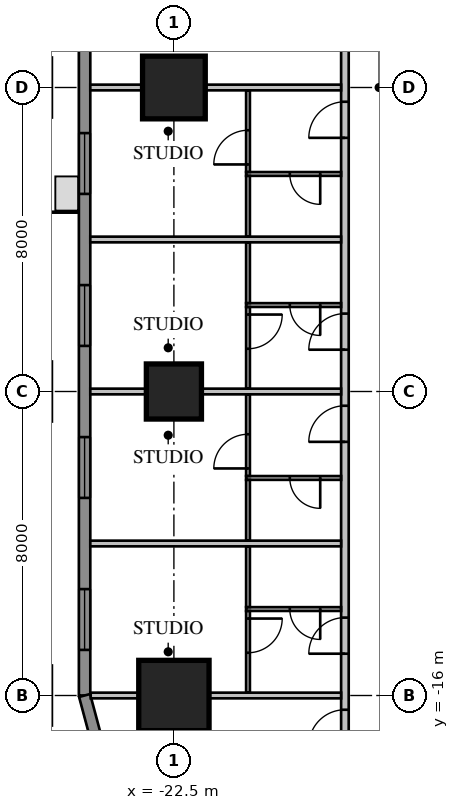
"""IFC4 building model, lengths in metres.
Left out: names, types, materials, properties, quantities, classifications, styles, units other than length and angle.
Written with IfcOpenShell. Run it as: python <this file> out.ifc"""

import sys

from ifc_helpers import new_model, si_unit, direction, frame, frame_2d, origin, origin_2d, place, context, subcontext, project, spatial, rectangle, extrude, element, fill, save


model = new_model("IFC4")
c1 = context("Model", 3, precision=1e-05, world=origin(), true_north=direction((0.0, 1.0)))
c2 = subcontext(c1, "Body", "Model", "MODEL_VIEW")
j1 = project(units=[si_unit("LENGTHUNIT", "METRE"), si_unit("PLANEANGLEUNIT", "RADIAN")], contexts=[c1])
p1 = place(None, origin())
s1 = spatial("IfcSite", under=j1, at=p1, CompositionType="ELEMENT")
p2 = place(p1, origin())
s2 = spatial("IfcBuilding", under=s1, at=p2, CompositionType="ELEMENT")
p3 = place(p2, frame((0.0, 0.0, 50.65)))
s3 = spatial("IfcBuildingStorey", under=s2, at=p3, CompositionType="ELEMENT", Elevation=50.65)
p4 = place(p3, frame((-22.5, 0.0, 0.0), z_axis=(0.0, 0.0, 1.0), x_axis=(1.0, 0.0, 0.0)))
e1 = element("IfcColumn", 1, at=p4, inside=s3, PredefinedType="COLUMN", context=c2, shape_type="SweptSolid", body=[
    extrude(rectangle(XDim=1.65, YDim=1.65, at=origin_2d()), origin(), (0.0, 0.0, 1.0), 3.413),
])
p5 = place(p3, frame((-22.5, -8.0, 0.0), z_axis=(0.0, 0.0, 1.0), x_axis=(1.0, 0.0, 0.0)))
e2 = element("IfcColumn", 2, at=p5, inside=s3, PredefinedType="COLUMN", context=c2, shape_type="SweptSolid", body=[
    extrude(rectangle(XDim=1.45, YDim=1.45, at=origin_2d()), origin(), (0.0, 0.0, 1.0), 3.413),
])
p6 = place(p3, frame((-22.5, -16.0, 0.0), z_axis=(0.0, 0.0, 1.0), x_axis=(1.0, 0.0, 0.0)))
e3 = element("IfcColumn", 3, at=p6, inside=s3, PredefinedType="COLUMN", context=c2, shape_type="SweptSolid", body=[
    extrude(rectangle(XDim=1.85, YDim=1.85, at=origin_2d()), origin(), (0.0, 0.0, 1.0), 3.413),
])
p7 = place(p3, frame((-24.85, 16.0, 0.0), z_axis=(0.0, 0.0, 1.0), x_axis=(0.0, -1.0, 0.0)))
e4 = element("IfcWall", 4, at=p7, inside=s3, PredefinedType="SOLIDWALL", context=c2, shape_type="SweptSolid", body=[
    extrude(rectangle(XDim=32.0, YDim=0.3, at=frame_2d((16.0, 0.0))), origin(), (0.0, 0.0, 1.0), 3.65),
])
p8 = place(p7, frame((1.2, 0.0, 0.75)))
e5 = element("IfcOpeningElement", 5, at=p8, cuts=e4, PredefinedType="OPENING", context=c2, shape_type="SweptSolid", body=[
    extrude(rectangle(XDim=1.6, YDim=1.8, at=frame_2d((0.8, 0.9))), frame((0.0, 0.17, 0.0), z_axis=(0.0, -1.0, 0.0), x_axis=(1.0, 0.0, 0.0)), (0.0, 0.0, 1.0), 0.34),
])
p9 = place(p7, frame((5.2, 0.0, 0.75)))
e6 = element("IfcOpeningElement", 6, at=p9, cuts=e4, PredefinedType="OPENING", context=c2, shape_type="SweptSolid", body=[
    extrude(rectangle(XDim=1.6, YDim=1.8, at=frame_2d((0.8, 0.9))), frame((0.0, 0.17, 0.0), z_axis=(0.0, -1.0, 0.0), x_axis=(1.0, 0.0, 0.0)), (0.0, 0.0, 1.0), 0.34),
])
p10 = place(p7, frame((17.2, 0.0, 0.75)))
e7 = element("IfcOpeningElement", 7, at=p10, cuts=e4, PredefinedType="OPENING", context=c2, shape_type="SweptSolid", body=[
    extrude(rectangle(XDim=1.6, YDim=1.8, at=frame_2d((0.8, 0.9))), frame((0.0, 0.17, 0.0), z_axis=(0.0, -1.0, 0.0), x_axis=(1.0, 0.0, 0.0)), (0.0, 0.0, 1.0), 0.34),
])
p11 = place(p7, frame((21.2, 0.0, 0.75)))
e8 = element("IfcOpeningElement", 8, at=p11, cuts=e4, PredefinedType="OPENING", context=c2, shape_type="SweptSolid", body=[
    extrude(rectangle(XDim=1.6, YDim=1.8, at=frame_2d((0.8, 0.9))), frame((0.0, 0.17, 0.0), z_axis=(0.0, -1.0, 0.0), x_axis=(1.0, 0.0, 0.0)), (0.0, 0.0, 1.0), 0.34),
])
p12 = place(p7, frame((25.2, 0.0, 0.75)))
e9 = element("IfcOpeningElement", 9, at=p12, cuts=e4, PredefinedType="OPENING", context=c2, shape_type="SweptSolid", body=[
    extrude(rectangle(XDim=1.6, YDim=1.8, at=frame_2d((0.8, 0.9))), frame((0.0, 0.17, 0.0), z_axis=(0.0, -1.0, 0.0), x_axis=(1.0, 0.0, 0.0)), (0.0, 0.0, 1.0), 0.34),
])
p13 = place(p7, frame((29.2, 0.0, 0.75)))
e10 = element("IfcOpeningElement", 10, at=p13, cuts=e4, PredefinedType="OPENING", context=c2, shape_type="SweptSolid", body=[
    extrude(rectangle(XDim=1.6, YDim=1.8, at=frame_2d((0.8, 0.9))), frame((0.0, 0.17, 0.0), z_axis=(0.0, -1.0, 0.0), x_axis=(1.0, 0.0, 0.0)), (0.0, 0.0, 1.0), 0.34),
])
p14 = place(p7, frame((8.8, 0.0, 0.75)))
e11 = element("IfcOpeningElement", 11, at=p14, cuts=e4, PredefinedType="OPENING", context=c2, shape_type="SweptSolid", body=[
    extrude(rectangle(XDim=2.4, YDim=1.8, at=frame_2d((1.2, 0.9))), frame((0.0, 0.17, 0.0), z_axis=(0.0, -1.0, 0.0), x_axis=(1.0, 0.0, 0.0)), (0.0, 0.0, 1.0), 0.34),
])
p15 = place(p7, frame((13.812, 0.0, 0.0)))
e12 = element("IfcOpeningElement", 12, at=p15, cuts=e4, PredefinedType="OPENING", context=c2, shape_type="SweptSolid", body=[
    extrude(rectangle(XDim=1.0, YDim=2.4, at=frame_2d((0.5, 1.2))), frame((0.0, 0.17, 0.0), z_axis=(0.0, -1.0, 0.0), x_axis=(1.0, 0.0, 0.0)), (0.0, 0.0, 1.0), 0.34),
])
p16 = place(p3, frame((-24.85, -16.0, 0.0), z_axis=(0.0, 0.0, 1.0), x_axis=(0.258839972501, -0.965920218567, 0.0)))
e13 = element("IfcWall", 13, at=p16, inside=s3, PredefinedType="SOLIDWALL", context=c2, shape_type="SweptSolid", body=[
    extrude(rectangle(XDim=4.581, YDim=0.3, at=frame_2d((2.291, 0.0))), origin(), (0.0, 0.0, 1.0), 3.65),
])
p17 = place(p3, frame((-18.0, 18.0, 0.0), z_axis=(0.0, 0.0, 1.0), x_axis=(0.0, -1.0, 0.0)))
e14 = element("IfcWall", 14, at=p17, inside=s3, PredefinedType="PARTITIONING", context=c2, shape_type="SweptSolid", body=[
    extrude(rectangle(XDim=36.0, YDim=0.2, at=frame_2d((18.0, 0.0))), origin(), (0.0, 0.0, 1.0), 3.65),
])
p18 = place(p17, frame((0.375, 0.0, 0.0)))
e15 = element("IfcOpeningElement", 15, at=p18, cuts=e14, PredefinedType="OPENING", context=c2, shape_type="SweptSolid", body=[
    extrude(rectangle(XDim=1.0, YDim=2.1, at=frame_2d((0.5, 1.05))), frame((0.0, 0.12, 0.0), z_axis=(0.0, -1.0, 0.0), x_axis=(1.0, 0.0, 0.0)), (0.0, 0.0, 1.0), 0.24),
])
p19 = place(p17, frame((2.375, 0.0, 0.0)))
e16 = element("IfcOpeningElement", 16, at=p19, cuts=e14, PredefinedType="OPENING", context=c2, shape_type="SweptSolid", body=[
    extrude(rectangle(XDim=0.95, YDim=2.1, at=frame_2d((0.475, 1.05))), frame((0.0, 0.12, 0.0), z_axis=(0.0, -1.0, 0.0), x_axis=(1.0, 0.0, 0.0)), (0.0, 0.0, 1.0), 0.24),
])
p20 = place(p17, frame((7.95, 0.0, 0.0)))
e17 = element("IfcOpeningElement", 17, at=p20, cuts=e14, PredefinedType="OPENING", context=c2, shape_type="SweptSolid", body=[
    extrude(rectangle(XDim=0.95, YDim=2.1, at=frame_2d((0.475, 1.05))), frame((0.0, 0.12, 0.0), z_axis=(0.0, -1.0, 0.0), x_axis=(1.0, 0.0, 0.0)), (0.0, 0.0, 1.0), 0.24),
])
p21 = place(p17, frame((18.375, 0.0, 0.0)))
e18 = element("IfcOpeningElement", 18, at=p21, cuts=e14, PredefinedType="OPENING", context=c2, shape_type="SweptSolid", body=[
    extrude(rectangle(XDim=0.95, YDim=2.1, at=frame_2d((0.475, 1.05))), frame((0.0, 0.12, 0.0), z_axis=(0.0, -1.0, 0.0), x_axis=(1.0, 0.0, 0.0)), (0.0, 0.0, 1.0), 0.24),
])
p22 = place(p17, frame((23.95, 0.0, 0.0)))
e19 = element("IfcOpeningElement", 19, at=p22, cuts=e14, PredefinedType="OPENING", context=c2, shape_type="SweptSolid", body=[
    extrude(rectangle(XDim=0.95, YDim=2.1, at=frame_2d((0.475, 1.05))), frame((0.0, 0.12, 0.0), z_axis=(0.0, -1.0, 0.0), x_axis=(1.0, 0.0, 0.0)), (0.0, 0.0, 1.0), 0.24),
])
p23 = place(p17, frame((26.375, 0.0, 0.0)))
e20 = element("IfcOpeningElement", 20, at=p23, cuts=e14, PredefinedType="OPENING", context=c2, shape_type="SweptSolid", body=[
    extrude(rectangle(XDim=0.95, YDim=2.1, at=frame_2d((0.475, 1.05))), frame((0.0, 0.12, 0.0), z_axis=(0.0, -1.0, 0.0), x_axis=(1.0, 0.0, 0.0)), (0.0, 0.0, 1.0), 0.24),
])
p24 = place(p17, frame((31.95, 0.0, 0.0)))
e21 = element("IfcOpeningElement", 21, at=p24, cuts=e14, PredefinedType="OPENING", context=c2, shape_type="SweptSolid", body=[
    extrude(rectangle(XDim=0.95, YDim=2.1, at=frame_2d((0.475, 1.05))), frame((0.0, 0.12, 0.0), z_axis=(0.0, -1.0, 0.0), x_axis=(1.0, 0.0, 0.0)), (0.0, 0.0, 1.0), 0.24),
])
p25 = place(p17, frame((34.375, 0.0, 0.0)))
e22 = element("IfcOpeningElement", 22, at=p25, cuts=e14, PredefinedType="OPENING", context=c2, shape_type="SweptSolid", body=[
    extrude(rectangle(XDim=0.95, YDim=2.1, at=frame_2d((0.475, 1.05))), frame((0.0, 0.12, 0.0), z_axis=(0.0, -1.0, 0.0), x_axis=(1.0, 0.0, 0.0)), (0.0, 0.0, 1.0), 0.24),
])
p26 = place(p17, frame((11.2, 0.0, 0.0)))
e23 = element("IfcOpeningElement", 23, at=p26, cuts=e14, PredefinedType="OPENING", context=c2, shape_type="SweptSolid", body=[
    extrude(rectangle(XDim=1.0, YDim=2.1, at=frame_2d((0.5, 1.05))), frame((0.0, 0.12, 0.0), z_axis=(0.0, -1.0, 0.0), x_axis=(1.0, 0.0, 0.0)), (0.0, 0.0, 1.0), 0.24),
])
p27 = place(p3, frame((-18.1, 0.0, 0.0), z_axis=(0.0, 0.0, 1.0), x_axis=(-1.0, 0.0, 0.0)))
e24 = element("IfcWall", 24, at=p27, inside=s3, PredefinedType="PARTITIONING", context=c2, shape_type="SweptSolid", body=[
    extrude(rectangle(XDim=6.6, YDim=0.15, at=frame_2d((3.3, 0.0))), origin(), (0.0, 0.0, 1.0), 2.888),
])
for number, where, z_axis, x_axis in (
    (25, (-18.1, -4.0, 0.0), (0.0, 0.0, 1.0), (-1.0, 0.0, 0.0)),
    (26, (-18.1, -8.0, 0.0), (0.0, 0.0, 1.0), (-1.0, 0.0, 0.0)),
    (27, (-18.1, -12.0, 0.0), (0.0, 0.0, 1.0), (-1.0, 0.0, 0.0)),
):
    element("IfcWall", number, at=place(p3, frame(where, z_axis=z_axis, x_axis=x_axis)), inside=s3, PredefinedType="PARTITIONING", context=c2, shape_type="SweptSolid", body=[
        extrude(rectangle(XDim=6.6, YDim=0.15, at=frame_2d((3.3, 0.0))), origin(), (0.0, 0.0, 1.0), 3.65),
    ])
p28 = place(p3, frame((-18.1, -16.0, 0.0), z_axis=(0.0, 0.0, 1.0), x_axis=(-1.0, 0.0, 0.0)))
e28 = element("IfcWall", 28, at=p28, inside=s3, PredefinedType="PARTITIONING", context=c2, shape_type="SweptSolid", body=[
    extrude(rectangle(XDim=6.589, YDim=0.15, at=frame_2d((3.295, 0.0))), origin(), (0.0, 0.0, 1.0), 3.65),
])
p29 = place(p3, frame((-18.1, -2.275, 0.0), z_axis=(0.0, 0.0, 1.0), x_axis=(-1.0, 0.0, 0.0)))
e29 = element("IfcWall", 29, at=p29, inside=s3, PredefinedType="PARTITIONING", context=c2, shape_type="SweptSolid", body=[
    extrude(rectangle(XDim=2.5, YDim=0.1, at=frame_2d((1.25, 0.0))), origin(), (0.0, 0.0, 1.0), 3.65),
])
p30 = place(p29, frame((0.55, 0.0, 0.0)))
e30 = element("IfcOpeningElement", 30, at=p30, cuts=e29, PredefinedType="OPENING", context=c2, shape_type="SweptSolid", body=[
    extrude(rectangle(XDim=0.8, YDim=2.1, at=frame_2d((0.4, 1.05))), frame((0.0, 0.07, 0.0), z_axis=(0.0, -1.0, 0.0), x_axis=(1.0, 0.0, 0.0)), (0.0, 0.0, 1.0), 0.14),
])
p31 = place(p3, frame((-20.55, -2.325, 0.0), z_axis=(0.0, 0.0, 1.0), x_axis=(0.0, -1.0, 0.0)))
e31 = element("IfcWall", 31, at=p31, inside=s3, PredefinedType="PARTITIONING", context=c2, shape_type="SweptSolid", body=[
    extrude(rectangle(XDim=1.6, YDim=0.1, at=frame_2d((0.8, 0.0))), origin(), (0.0, 0.0, 1.0), 3.65),
])
p32 = place(p3, frame((-18.1, -5.725, 0.0), z_axis=(0.0, 0.0, 1.0), x_axis=(-1.0, 0.0, 0.0)))
e32 = element("IfcWall", 32, at=p32, inside=s3, PredefinedType="PARTITIONING", context=c2, shape_type="SweptSolid", body=[
    extrude(rectangle(XDim=2.5, YDim=0.1, at=frame_2d((1.25, 0.0))), origin(), (0.0, 0.0, 1.0), 3.65),
])
p33 = place(p32, frame((0.55, 0.0, 0.0)))
e33 = element("IfcOpeningElement", 33, at=p33, cuts=e32, PredefinedType="OPENING", context=c2, shape_type="SweptSolid", body=[
    extrude(rectangle(XDim=0.8, YDim=2.1, at=frame_2d((0.4, 1.05))), frame((0.0, 0.07, 0.0), z_axis=(0.0, -1.0, 0.0), x_axis=(1.0, 0.0, 0.0)), (0.0, 0.0, 1.0), 0.14),
])
p34 = place(p3, frame((-20.55, -4.075, 0.0), z_axis=(0.0, 0.0, 1.0), x_axis=(0.0, -1.0, 0.0)))
e34 = element("IfcWall", 34, at=p34, inside=s3, PredefinedType="PARTITIONING", context=c2, shape_type="SweptSolid", body=[
    extrude(rectangle(XDim=1.6, YDim=0.1, at=frame_2d((0.8, 0.0))), origin(), (0.0, 0.0, 1.0), 3.65),
])
p35 = place(p3, frame((-18.1, -10.275, 0.0), z_axis=(0.0, 0.0, 1.0), x_axis=(-1.0, 0.0, 0.0)))
e35 = element("IfcWall", 35, at=p35, inside=s3, PredefinedType="PARTITIONING", context=c2, shape_type="SweptSolid", body=[
    extrude(rectangle(XDim=2.5, YDim=0.1, at=frame_2d((1.25, 0.0))), origin(), (0.0, 0.0, 1.0), 3.65),
])
p36 = place(p35, frame((0.55, 0.0, 0.0)))
e36 = element("IfcOpeningElement", 36, at=p36, cuts=e35, PredefinedType="OPENING", context=c2, shape_type="SweptSolid", body=[
    extrude(rectangle(XDim=0.8, YDim=2.1, at=frame_2d((0.4, 1.05))), frame((0.0, 0.07, 0.0), z_axis=(0.0, -1.0, 0.0), x_axis=(1.0, 0.0, 0.0)), (0.0, 0.0, 1.0), 0.14),
])
p37 = place(p3, frame((-20.55, -10.325, 0.0), z_axis=(0.0, 0.0, 1.0), x_axis=(0.0, -1.0, 0.0)))
e37 = element("IfcWall", 37, at=p37, inside=s3, PredefinedType="PARTITIONING", context=c2, shape_type="SweptSolid", body=[
    extrude(rectangle(XDim=1.6, YDim=0.1, at=frame_2d((0.8, 0.0))), origin(), (0.0, 0.0, 1.0), 3.65),
])
p38 = place(p3, frame((-18.1, -13.725, 0.0), z_axis=(0.0, 0.0, 1.0), x_axis=(-1.0, 0.0, 0.0)))
e38 = element("IfcWall", 38, at=p38, inside=s3, PredefinedType="PARTITIONING", context=c2, shape_type="SweptSolid", body=[
    extrude(rectangle(XDim=2.5, YDim=0.1, at=frame_2d((1.25, 0.0))), origin(), (0.0, 0.0, 1.0), 3.65),
])
p39 = place(p38, frame((0.55, 0.0, 0.0)))
e39 = element("IfcOpeningElement", 39, at=p39, cuts=e38, PredefinedType="OPENING", context=c2, shape_type="SweptSolid", body=[
    extrude(rectangle(XDim=0.8, YDim=2.1, at=frame_2d((0.4, 1.05))), frame((0.0, 0.07, 0.0), z_axis=(0.0, -1.0, 0.0), x_axis=(1.0, 0.0, 0.0)), (0.0, 0.0, 1.0), 0.14),
])
p40 = place(p3, frame((-20.55, -12.075, 0.0), z_axis=(0.0, 0.0, 1.0), x_axis=(0.0, -1.0, 0.0)))
e40 = element("IfcWall", 40, at=p40, inside=s3, PredefinedType="PARTITIONING", context=c2, shape_type="SweptSolid", body=[
    extrude(rectangle(XDim=1.6, YDim=0.1, at=frame_2d((0.8, 0.0))), origin(), (0.0, 0.0, 1.0), 3.65),
])
p41 = place(p3, frame((-20.55, -0.075, 0.0), z_axis=(0.0, 0.0, 1.0), x_axis=(0.0, -1.0, 0.0)))
e41 = element("IfcWall", 41, at=p41, inside=s3, PredefinedType="PARTITIONING", context=c2, shape_type="SweptSolid", body=[
    extrude(rectangle(XDim=2.15, YDim=0.1, at=frame_2d((1.075, 0.0))), origin(), (0.0, 0.0, 1.0), 3.65),
])
p42 = place(p41, frame((1.05, 0.0, 0.0)))
e42 = element("IfcOpeningElement", 42, at=p42, cuts=e41, PredefinedType="OPENING", context=c2, shape_type="SweptSolid", body=[
    extrude(rectangle(XDim=0.9, YDim=2.1, at=frame_2d((0.45, 1.05))), frame((0.0, 0.07, 0.0), z_axis=(0.0, -1.0, 0.0), x_axis=(1.0, 0.0, 0.0)), (0.0, 0.0, 1.0), 0.14),
])
p43 = place(p3, frame((-20.55, -5.775, 0.0), z_axis=(0.0, 0.0, 1.0), x_axis=(0.0, -1.0, 0.0)))
e43 = element("IfcWall", 43, at=p43, inside=s3, PredefinedType="PARTITIONING", context=c2, shape_type="SweptSolid", body=[
    extrude(rectangle(XDim=2.15, YDim=0.1, at=frame_2d((1.075, 0.0))), origin(), (0.0, 0.0, 1.0), 3.65),
])
p44 = place(p43, frame((0.2, 0.0, 0.0)))
e44 = element("IfcOpeningElement", 44, at=p44, cuts=e43, PredefinedType="OPENING", context=c2, shape_type="SweptSolid", body=[
    extrude(rectangle(XDim=0.9, YDim=2.1, at=frame_2d((0.45, 1.05))), frame((0.0, 0.07, 0.0), z_axis=(0.0, -1.0, 0.0), x_axis=(1.0, 0.0, 0.0)), (0.0, 0.0, 1.0), 0.14),
])
p45 = place(p3, frame((-20.55, -8.075, 0.0), z_axis=(0.0, 0.0, 1.0), x_axis=(0.0, -1.0, 0.0)))
e45 = element("IfcWall", 45, at=p45, inside=s3, PredefinedType="PARTITIONING", context=c2, shape_type="SweptSolid", body=[
    extrude(rectangle(XDim=2.15, YDim=0.1, at=frame_2d((1.075, 0.0))), origin(), (0.0, 0.0, 1.0), 3.65),
])
p46 = place(p45, frame((1.05, 0.0, 0.0)))
e46 = element("IfcOpeningElement", 46, at=p46, cuts=e45, PredefinedType="OPENING", context=c2, shape_type="SweptSolid", body=[
    extrude(rectangle(XDim=0.9, YDim=2.1, at=frame_2d((0.45, 1.05))), frame((0.0, 0.07, 0.0), z_axis=(0.0, -1.0, 0.0), x_axis=(1.0, 0.0, 0.0)), (0.0, 0.0, 1.0), 0.14),
])
p47 = place(p3, frame((-20.55, -13.775, 0.0), z_axis=(0.0, 0.0, 1.0), x_axis=(0.0, -1.0, 0.0)))
e47 = element("IfcWall", 47, at=p47, inside=s3, PredefinedType="PARTITIONING", context=c2, shape_type="SweptSolid", body=[
    extrude(rectangle(XDim=2.15, YDim=0.1, at=frame_2d((1.075, 0.0))), origin(), (0.0, 0.0, 1.0), 3.65),
])
p48 = place(p47, frame((0.2, 0.0, 0.0)))
e48 = element("IfcOpeningElement", 48, at=p48, cuts=e47, PredefinedType="OPENING", context=c2, shape_type="SweptSolid", body=[
    extrude(rectangle(XDim=0.9, YDim=2.1, at=frame_2d((0.45, 1.05))), frame((0.0, 0.07, 0.0), z_axis=(0.0, -1.0, 0.0), x_axis=(1.0, 0.0, 0.0)), (0.0, 0.0, 1.0), 0.14),
])
p49 = place(p10, origin())
e49 = element("IfcWindow", 49, at=p49, inside=s3, PartitioningType="SINGLE_PANEL", PredefinedType="WINDOW", context=c2, shape_type="SweptSolid", body=[
    extrude(rectangle(XDim=1.6, YDim=1.8, at=frame_2d((0.8, 0.9))), frame((0.0, 0.03, 0.0), z_axis=(0.0, -1.0, 0.0), x_axis=(1.0, 0.0, 0.0)), (0.0, 0.0, 1.0), 0.06),
])
fill(e7, e49)
p50 = place(p11, origin())
e50 = element("IfcWindow", 50, at=p50, inside=s3, PartitioningType="SINGLE_PANEL", PredefinedType="WINDOW", context=c2, shape_type="SweptSolid", body=[
    extrude(rectangle(XDim=1.6, YDim=1.8, at=frame_2d((0.8, 0.9))), frame((0.0, 0.03, 0.0), z_axis=(0.0, -1.0, 0.0), x_axis=(1.0, 0.0, 0.0)), (0.0, 0.0, 1.0), 0.06),
])
fill(e8, e50)
p51 = place(p12, origin())
e51 = element("IfcWindow", 51, at=p51, inside=s3, PartitioningType="SINGLE_PANEL", PredefinedType="WINDOW", context=c2, shape_type="SweptSolid", body=[
    extrude(rectangle(XDim=1.6, YDim=1.8, at=frame_2d((0.8, 0.9))), frame((0.0, 0.03, 0.0), z_axis=(0.0, -1.0, 0.0), x_axis=(1.0, 0.0, 0.0)), (0.0, 0.0, 1.0), 0.06),
])
fill(e9, e51)
p52 = place(p13, origin())
e52 = element("IfcWindow", 52, at=p52, inside=s3, PartitioningType="SINGLE_PANEL", PredefinedType="WINDOW", context=c2, shape_type="SweptSolid", body=[
    extrude(rectangle(XDim=1.6, YDim=1.8, at=frame_2d((0.8, 0.9))), frame((0.0, 0.03, 0.0), z_axis=(0.0, -1.0, 0.0), x_axis=(1.0, 0.0, 0.0)), (0.0, 0.0, 1.0), 0.06),
])
fill(e10, e52)
p53 = place(p21, origin())
e53 = element("IfcDoor", 53, at=p53, inside=s3, OperationType="SINGLE_SWING_RIGHT", PredefinedType="DOOR", context=c2, shape_type="SweptSolid", body=[
    extrude(rectangle(XDim=0.95, YDim=2.1, at=frame_2d((0.475, 1.05))), frame((0.0, 0.025, 0.0), z_axis=(0.0, -1.0, 0.0), x_axis=(1.0, 0.0, 0.0)), (0.0, 0.0, 1.0), 0.05),
])
fill(e18, e53)
p54 = place(p30, origin())
e54 = element("IfcDoor", 54, at=p54, inside=s3, OperationType="SINGLE_SWING_LEFT", PredefinedType="DOOR", context=c2, shape_type="SweptSolid", body=[
    extrude(rectangle(XDim=0.8, YDim=2.1, at=frame_2d((0.4, 1.05))), frame((0.0, 0.025, 0.0), z_axis=(0.0, -1.0, 0.0), x_axis=(1.0, 0.0, 0.0)), (0.0, 0.0, 1.0), 0.05),
])
fill(e30, e54)
p55 = place(p22, origin())
e55 = element("IfcDoor", 55, at=p55, inside=s3, OperationType="SINGLE_SWING_RIGHT", PredefinedType="DOOR", context=c2, shape_type="SweptSolid", body=[
    extrude(rectangle(XDim=0.95, YDim=2.1, at=frame_2d((0.475, 1.05))), frame((0.0, 0.025, 0.0), z_axis=(0.0, -1.0, 0.0), x_axis=(1.0, 0.0, 0.0)), (0.0, 0.0, 1.0), 0.05),
])
fill(e19, e55)
p56 = place(p33, origin())
e56 = element("IfcDoor", 56, at=p56, inside=s3, OperationType="SINGLE_SWING_LEFT", PredefinedType="DOOR", context=c2, shape_type="SweptSolid", body=[
    extrude(rectangle(XDim=0.8, YDim=2.1, at=frame_2d((0.4, 1.05))), frame((0.0, 0.025, 0.0), z_axis=(0.0, -1.0, 0.0), x_axis=(1.0, 0.0, 0.0)), (0.0, 0.0, 1.0), 0.05),
])
fill(e33, e56)
p57 = place(p23, origin())
e57 = element("IfcDoor", 57, at=p57, inside=s3, OperationType="SINGLE_SWING_RIGHT", PredefinedType="DOOR", context=c2, shape_type="SweptSolid", body=[
    extrude(rectangle(XDim=0.95, YDim=2.1, at=frame_2d((0.475, 1.05))), frame((0.0, 0.025, 0.0), z_axis=(0.0, -1.0, 0.0), x_axis=(1.0, 0.0, 0.0)), (0.0, 0.0, 1.0), 0.05),
])
fill(e20, e57)
p58 = place(p36, origin())
e58 = element("IfcDoor", 58, at=p58, inside=s3, OperationType="SINGLE_SWING_LEFT", PredefinedType="DOOR", context=c2, shape_type="SweptSolid", body=[
    extrude(rectangle(XDim=0.8, YDim=2.1, at=frame_2d((0.4, 1.05))), frame((0.0, 0.025, 0.0), z_axis=(0.0, -1.0, 0.0), x_axis=(1.0, 0.0, 0.0)), (0.0, 0.0, 1.0), 0.05),
])
fill(e36, e58)
p59 = place(p24, origin())
e59 = element("IfcDoor", 59, at=p59, inside=s3, OperationType="SINGLE_SWING_RIGHT", PredefinedType="DOOR", context=c2, shape_type="SweptSolid", body=[
    extrude(rectangle(XDim=0.95, YDim=2.1, at=frame_2d((0.475, 1.05))), frame((0.0, 0.025, 0.0), z_axis=(0.0, -1.0, 0.0), x_axis=(1.0, 0.0, 0.0)), (0.0, 0.0, 1.0), 0.05),
])
fill(e21, e59)
p60 = place(p39, origin())
e60 = element("IfcDoor", 60, at=p60, inside=s3, OperationType="SINGLE_SWING_LEFT", PredefinedType="DOOR", context=c2, shape_type="SweptSolid", body=[
    extrude(rectangle(XDim=0.8, YDim=2.1, at=frame_2d((0.4, 1.05))), frame((0.0, 0.025, 0.0), z_axis=(0.0, -1.0, 0.0), x_axis=(1.0, 0.0, 0.0)), (0.0, 0.0, 1.0), 0.05),
])
fill(e39, e60)
p61 = place(p25, origin())
e61 = element("IfcDoor", 61, at=p61, inside=s3, OperationType="SINGLE_SWING_RIGHT", PredefinedType="DOOR", context=c2, shape_type="SweptSolid", body=[
    extrude(rectangle(XDim=0.95, YDim=2.1, at=frame_2d((0.475, 1.05))), frame((0.0, 0.025, 0.0), z_axis=(0.0, -1.0, 0.0), x_axis=(1.0, 0.0, 0.0)), (0.0, 0.0, 1.0), 0.05),
])
fill(e22, e61)
p62 = place(p42, origin())
e62 = element("IfcDoor", 62, at=p62, inside=s3, OperationType="SINGLE_SWING_RIGHT", PredefinedType="DOOR", context=c2, shape_type="SweptSolid", body=[
    extrude(rectangle(XDim=0.9, YDim=2.1, at=frame_2d((0.45, 1.05))), frame((0.0, 0.025, 0.0), z_axis=(0.0, -1.0, 0.0), x_axis=(1.0, 0.0, 0.0)), (0.0, 0.0, 1.0), 0.05),
])
fill(e42, e62)
p63 = place(p44, origin())
e63 = element("IfcDoor", 63, at=p63, inside=s3, OperationType="SINGLE_SWING_LEFT", PredefinedType="DOOR", context=c2, shape_type="SweptSolid", body=[
    extrude(rectangle(XDim=0.9, YDim=2.1, at=frame_2d((0.45, 1.05))), frame((0.0, 0.025, 0.0), z_axis=(0.0, -1.0, 0.0), x_axis=(1.0, 0.0, 0.0)), (0.0, 0.0, 1.0), 0.05),
])
fill(e44, e63)
p64 = place(p46, origin())
e64 = element("IfcDoor", 64, at=p64, inside=s3, OperationType="SINGLE_SWING_RIGHT", PredefinedType="DOOR", context=c2, shape_type="SweptSolid", body=[
    extrude(rectangle(XDim=0.9, YDim=2.1, at=frame_2d((0.45, 1.05))), frame((0.0, 0.025, 0.0), z_axis=(0.0, -1.0, 0.0), x_axis=(1.0, 0.0, 0.0)), (0.0, 0.0, 1.0), 0.05),
])
fill(e46, e64)
p65 = place(p48, origin())
e65 = element("IfcDoor", 65, at=p65, inside=s3, OperationType="SINGLE_SWING_LEFT", PredefinedType="DOOR", context=c2, shape_type="SweptSolid", body=[
    extrude(rectangle(XDim=0.9, YDim=2.1, at=frame_2d((0.45, 1.05))), frame((0.0, 0.025, 0.0), z_axis=(0.0, -1.0, 0.0), x_axis=(1.0, 0.0, 0.0)), (0.0, 0.0, 1.0), 0.05),
])
fill(e48, e65)
save(model, sys.argv[1])
